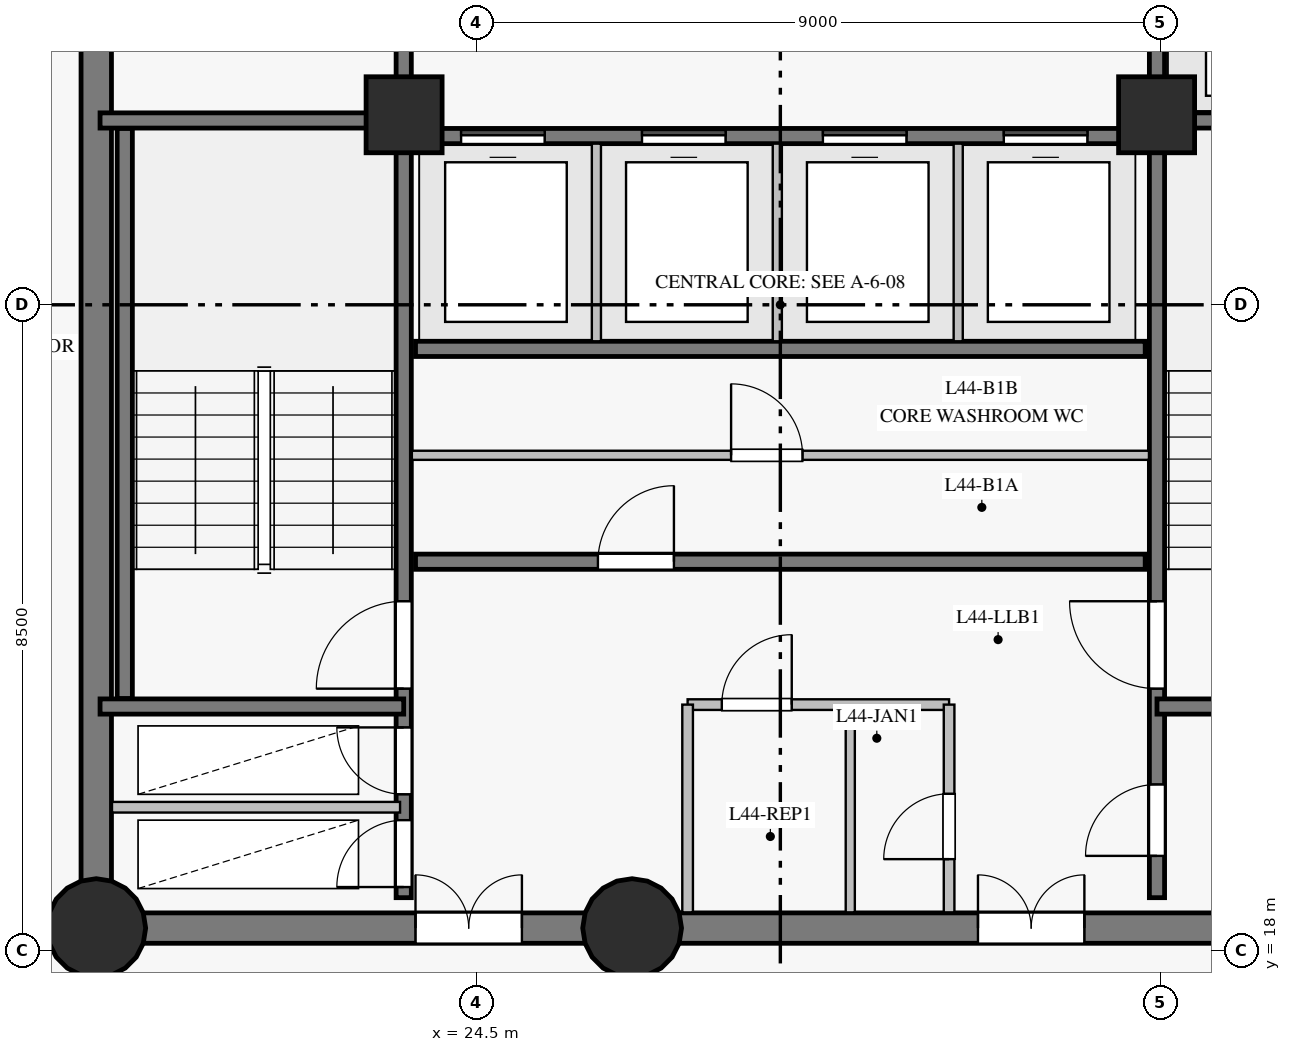
"""IFC4 building model, lengths in metres.
Left out: names, types, materials, properties, quantities, classifications, styles, units other than length and angle.
Written with IfcOpenShell. Run it as: python <this file> out.ifc"""

import sys

from ifc_helpers import new_model, si_unit, direction, frame, frame_2d, origin, origin_with_axes, origin_2d, place, context, subcontext, project, spatial, rectangle, circle, extrude, source, transform, mapped, element, fill, save


model = new_model("IFC4")
c1 = context("Model", 3, precision=1e-05, world=origin(), true_north=direction((0.0, 1.0)))
c2 = subcontext(c1, "Body", "Model", "MODEL_VIEW")
j1 = project(units=[si_unit("LENGTHUNIT", "METRE"), si_unit("PLANEANGLEUNIT", "RADIAN")], contexts=[c1])
p1 = place(None, origin())
s1 = spatial("IfcSite", under=j1, at=p1, CompositionType="ELEMENT")
p2 = place(p1, origin())
s2 = spatial("IfcBuilding", under=s1, at=p2, CompositionType="ELEMENT")
p3 = place(p2, frame((0.0, 0.0, 156.55)))
s3 = spatial("IfcBuildingStorey", under=s2, at=p3, CompositionType="ELEMENT", Elevation=156.55)
p4 = place(p3, frame((19.5, 18.3, 0.0), z_axis=(0.0, 0.0, 1.0), x_axis=(1.0, 0.0, 0.0)))
e1 = element("IfcWall", 1, at=p4, inside=s3, PredefinedType="SHEAR", context=c2, shape_type="SweptSolid", body=[
    extrude(rectangle(XDim=7.05, YDim=0.4, at=frame_2d((3.525, 0.0))), origin(), (0.0, 0.0, 1.0), 2.825),
])
p5 = place(p4, frame((4.2, 0.0, 0.0)))
e2 = element("IfcOpeningElement", 2, at=p5, cuts=e1, PredefinedType="OPENING", context=c2, shape_type="SweptSolid", body=[
    extrude(rectangle(XDim=1.4, YDim=2.2, at=frame_2d((0.7, 1.1))), frame((0.0, 0.21, 0.0), z_axis=(0.0, -1.0, 0.0), x_axis=(1.0, 0.0, 0.0)), (0.0, 0.0, 1.0), 0.42),
])
p6 = place(p3, frame((26.55, 18.3, 0.0), z_axis=(0.0, 0.0, 1.0), x_axis=(1.0, 0.0, 0.0)))
e3 = element("IfcWall", 3, at=p6, inside=s3, PredefinedType="SHEAR", context=c2, shape_type="SweptSolid", body=[
    extrude(rectangle(XDim=10.95, YDim=0.4, at=frame_2d((5.475, 0.0))), origin(), (0.0, 0.0, 1.0), 2.825),
])
p7 = place(p6, frame((4.55, 0.0, 0.0)))
e4 = element("IfcOpeningElement", 4, at=p7, cuts=e3, PredefinedType="OPENING", context=c2, shape_type="SweptSolid", body=[
    extrude(rectangle(XDim=1.4, YDim=2.2, at=frame_2d((0.7, 1.1))), frame((0.0, 0.21, 0.0), z_axis=(0.0, -1.0, 0.0), x_axis=(1.0, 0.0, 0.0)), (0.0, 0.0, 1.0), 0.42),
])
p8 = place(p3, frame((19.5, 34.7, 0.0), z_axis=(0.0, 0.0, 1.0), x_axis=(0.0, -1.0, 0.0)))
e5 = element("IfcWall", 5, at=p8, inside=s3, PredefinedType="SHEAR", context=c2, shape_type="SweptSolid", body=[
    extrude(rectangle(XDim=16.4, YDim=0.4, at=frame_2d((8.2, 0.0))), origin(), (0.0, 0.0, 1.0), 2.825),
])
p9 = place(p8, frame((3.1, 0.0, 0.0)))
e6 = element("IfcOpeningElement", 6, at=p9, cuts=e5, PredefinedType="OPENING", context=c2, shape_type="SweptSolid", body=[
    extrude(rectangle(XDim=1.1, YDim=2.15, at=frame_2d((0.55, 1.075))), frame((0.0, 0.21, 0.0), z_axis=(0.0, -1.0, 0.0), x_axis=(1.0, 0.0, 0.0)), (0.0, 0.0, 1.0), 0.42),
])
m1 = source(origin_with_axes(), c2, "Body", "SweptSolid", [
    extrude(circle(Radius=0.65, at=origin_2d()), origin(), (0.0, 0.0, 1.0), 3.05),
])
for number, where, z_axis, x_axis in (
    (7, (19.5, 18.3, 0.0), (0.0, 0.0, 1.0), (1.0, 0.0, 0.0)),
    (8, (26.55, 18.3, 0.0), (0.0, 0.0, 1.0), (1.0, 0.0, 0.0)),
):
    element("IfcColumn", number, at=place(p3, frame(where, z_axis=z_axis, x_axis=x_axis)), inside=s3, PredefinedType="COLUMN", context=c2, shape_type="MappedRepresentation", body=[
        mapped(m1, transform((0.0, 0.0, 0.0), scale=1.0)),
    ])
m2 = source(origin_with_axes(), c2, "Body", "SweptSolid", [
    extrude(rectangle(XDim=1.0, YDim=1.0, at=origin_2d()), origin(), (0.0, 0.0, 1.0), 3.05),
])
for number, where, z_axis, x_axis in (
    (9, (23.55, 29.0, 0.0), (0.0, 0.0, 1.0), (1.0, 0.0, 0.0)),
    (10, (33.45, 29.0, 0.0), (0.0, 0.0, 1.0), (1.0, 0.0, 0.0)),
):
    element("IfcColumn", number, at=place(p3, frame(where, z_axis=z_axis, x_axis=x_axis)), inside=s3, PredefinedType="COLUMN", context=c2, shape_type="MappedRepresentation", body=[
        mapped(m2, transform((0.0, 0.0, 0.0), scale=1.0)),
    ])
p10 = place(p3, frame((23.545, 18.7, 0.0), z_axis=(0.0, 0.0, 1.0), x_axis=(0.0, 1.0, 0.0)))
e11 = element("IfcWall", 11, at=p10, inside=s3, PredefinedType="SHEAR", context=c2, shape_type="SweptSolid", body=[
    extrude(rectangle(XDim=15.6, YDim=0.2, at=frame_2d((7.8, 0.0))), origin(), (0.0, 0.0, 1.0), 2.825),
])
p11 = place(p10, frame((2.75, 0.0, 0.0)))
e12 = element("IfcOpeningElement", 12, at=p11, cuts=e11, PredefinedType="OPENING", context=c2, shape_type="SweptSolid", body=[
    extrude(rectangle(XDim=1.15, YDim=2.15, at=frame_2d((0.575, 1.075))), frame((0.0, 0.11, 0.0), z_axis=(0.0, -1.0, 0.0), x_axis=(1.0, 0.0, 0.0)), (0.0, 0.0, 1.0), 0.22),
])
p12 = place(p10, frame((0.14, 0.0, 0.0)))
e13 = element("IfcOpeningElement", 13, at=p12, cuts=e11, PredefinedType="OPENING", context=c2, shape_type="SweptSolid", body=[
    extrude(rectangle(XDim=0.88, YDim=2.1, at=frame_2d((0.44, 1.05))), frame((0.0, 0.11, 0.0), z_axis=(0.0, -1.0, 0.0), x_axis=(1.0, 0.0, 0.0)), (0.0, 0.0, 1.0), 0.22),
])
p13 = place(p10, frame((1.36, 0.0, 0.0)))
e14 = element("IfcOpeningElement", 14, at=p13, cuts=e11, PredefinedType="OPENING", context=c2, shape_type="SweptSolid", body=[
    extrude(rectangle(XDim=0.88, YDim=2.1, at=frame_2d((0.44, 1.05))), frame((0.0, 0.11, 0.0), z_axis=(0.0, -1.0, 0.0), x_axis=(1.0, 0.0, 0.0)), (0.0, 0.0, 1.0), 0.22),
])
p14 = place(p10, frame((12.1, 0.0, 0.0)))
e15 = element("IfcOpeningElement", 15, at=p14, cuts=e11, PredefinedType="OPENING", context=c2, shape_type="SweptSolid", body=[
    extrude(rectangle(XDim=1.12, YDim=2.15, at=frame_2d((0.56, 1.075))), frame((0.0, 0.11, 0.0), z_axis=(0.0, -1.0, 0.0), x_axis=(1.0, 0.0, 0.0)), (0.0, 0.0, 1.0), 0.22),
])
p15 = place(p10, frame((14.05, 0.0, 0.0)))
e16 = element("IfcOpeningElement", 16, at=p15, cuts=e11, PredefinedType="OPENING", context=c2, shape_type="SweptSolid", body=[
    extrude(rectangle(XDim=1.12, YDim=2.15, at=frame_2d((0.56, 1.075))), frame((0.0, 0.11, 0.0), z_axis=(0.0, -1.0, 0.0), x_axis=(1.0, 0.0, 0.0)), (0.0, 0.0, 1.0), 0.22),
])
p16 = place(p3, frame((33.455, 18.7, 0.0), z_axis=(0.0, 0.0, 1.0), x_axis=(0.0, 1.0, 0.0)))
e17 = element("IfcWall", 17, at=p16, inside=s3, PredefinedType="SHEAR", context=c2, shape_type="SweptSolid", body=[
    extrude(rectangle(XDim=15.6, YDim=0.2, at=frame_2d((7.8, 0.0))), origin(), (0.0, 0.0, 1.0), 2.825),
])
p17 = place(p16, frame((2.75, 0.0, 0.0)))
e18 = element("IfcOpeningElement", 18, at=p17, cuts=e17, PredefinedType="OPENING", context=c2, shape_type="SweptSolid", body=[
    extrude(rectangle(XDim=1.15, YDim=2.15, at=frame_2d((0.575, 1.075))), frame((0.0, 0.11, 0.0), z_axis=(0.0, -1.0, 0.0), x_axis=(1.0, 0.0, 0.0)), (0.0, 0.0, 1.0), 0.22),
])
p18 = place(p16, frame((0.55, 0.0, 0.0)))
e19 = element("IfcOpeningElement", 19, at=p18, cuts=e17, PredefinedType="OPENING", context=c2, shape_type="SweptSolid", body=[
    extrude(rectangle(XDim=0.94, YDim=2.1, at=frame_2d((0.47, 1.05))), frame((0.0, 0.11, 0.0), z_axis=(0.0, -1.0, 0.0), x_axis=(1.0, 0.0, 0.0)), (0.0, 0.0, 1.0), 0.22),
])
p19 = place(p3, frame((23.7, 23.12, 0.0), z_axis=(0.0, 0.0, 1.0), x_axis=(1.0, 0.0, 0.0)))
e20 = element("IfcWall", 20, at=p19, inside=s3, PredefinedType="SHEAR", context=c2, shape_type="SweptSolid", body=[
    extrude(rectangle(XDim=9.6, YDim=0.2, at=frame_2d((4.8, 0.0))), origin(), (0.0, 0.0, 1.0), 2.825),
])
p20 = place(p19, frame((2.4, 0.0, 0.0)))
e21 = element("IfcOpeningElement", 21, at=p20, cuts=e20, PredefinedType="OPENING", context=c2, shape_type="SweptSolid", body=[
    extrude(rectangle(XDim=1.0, YDim=2.15, at=frame_2d((0.5, 1.075))), frame((0.0, 0.11, 0.0), z_axis=(0.0, -1.0, 0.0), x_axis=(1.0, 0.0, 0.0)), (0.0, 0.0, 1.0), 0.22),
])
p21 = place(p3, frame((23.7, 25.92, 0.0), z_axis=(0.0, 0.0, 1.0), x_axis=(1.0, 0.0, 0.0)))
e22 = element("IfcWall", 22, at=p21, inside=s3, PredefinedType="SHEAR", context=c2, shape_type="SweptSolid", body=[
    extrude(rectangle(XDim=9.6, YDim=0.2, at=frame_2d((4.8, 0.0))), origin(), (0.0, 0.0, 1.0), 2.825),
])
p22 = place(p3, frame((23.7, 28.72, 0.0), z_axis=(0.0, 0.0, 1.0), x_axis=(1.0, 0.0, 0.0)))
e23 = element("IfcWall", 23, at=p22, inside=s3, PredefinedType="SHEAR", context=c2, shape_type="SweptSolid", body=[
    extrude(rectangle(XDim=9.6, YDim=0.2, at=frame_2d((4.8, 0.0))), origin(), (0.0, 0.0, 1.0), 2.825),
])
p23 = place(p22, frame((0.6, 0.0, 0.0)))
e24 = element("IfcOpeningElement", 24, at=p23, cuts=e23, PredefinedType="OPENING", context=c2, shape_type="SweptSolid", body=[
    extrude(rectangle(XDim=1.1, YDim=2.15, at=frame_2d((0.55, 1.075))), frame((0.0, 0.11, 0.0), z_axis=(0.0, -1.0, 0.0), x_axis=(1.0, 0.0, 0.0)), (0.0, 0.0, 1.0), 0.22),
])
p24 = place(p22, frame((2.98, 0.0, 0.0)))
e25 = element("IfcOpeningElement", 25, at=p24, cuts=e23, PredefinedType="OPENING", context=c2, shape_type="SweptSolid", body=[
    extrude(rectangle(XDim=1.1, YDim=2.15, at=frame_2d((0.55, 1.075))), frame((0.0, 0.11, 0.0), z_axis=(0.0, -1.0, 0.0), x_axis=(1.0, 0.0, 0.0)), (0.0, 0.0, 1.0), 0.22),
])
p25 = place(p22, frame((5.36, 0.0, 0.0)))
e26 = element("IfcOpeningElement", 26, at=p25, cuts=e23, PredefinedType="OPENING", context=c2, shape_type="SweptSolid", body=[
    extrude(rectangle(XDim=1.1, YDim=2.15, at=frame_2d((0.55, 1.075))), frame((0.0, 0.11, 0.0), z_axis=(0.0, -1.0, 0.0), x_axis=(1.0, 0.0, 0.0)), (0.0, 0.0, 1.0), 0.22),
])
p26 = place(p22, frame((7.74, 0.0, 0.0)))
e27 = element("IfcOpeningElement", 27, at=p26, cuts=e23, PredefinedType="OPENING", context=c2, shape_type="SweptSolid", body=[
    extrude(rectangle(XDim=1.1, YDim=2.15, at=frame_2d((0.55, 1.075))), frame((0.0, 0.11, 0.0), z_axis=(0.0, -1.0, 0.0), x_axis=(1.0, 0.0, 0.0)), (0.0, 0.0, 1.0), 0.22),
])
p27 = place(p3, frame((19.875, 21.32, 0.0), z_axis=(0.0, 0.0, 1.0), x_axis=(0.0, 1.0, 0.0)))
e28 = element("IfcWall", 28, at=p27, inside=s3, PredefinedType="SHEAR", context=c2, shape_type="SweptSolid", body=[
    extrude(rectangle(XDim=7.5, YDim=0.2, at=frame_2d((3.75, 0.0))), origin(), (0.0, 0.0, 1.0), 2.825),
])
for number, where, z_axis, x_axis in (
    (29, (33.455, 21.215, 0.0), (0.0, 0.0, 1.0), (1.0, 0.0, 0.0)),
    (30, (33.455, 28.925, 0.0), (0.0, 0.0, 1.0), (1.0, 0.0, 0.0)),
    (31, (19.55, 21.215, 0.0), (0.0, 0.0, 1.0), (1.0, 0.0, 0.0)),
    (32, (19.55, 28.925, 0.0), (0.0, 0.0, 1.0), (1.0, 0.0, 0.0)),
):
    element("IfcWall", number, at=place(p3, frame(where, z_axis=z_axis, x_axis=x_axis)), inside=s3, PredefinedType="SHEAR", context=c2, shape_type="SweptSolid", body=[
        extrude(rectangle(XDim=3.995, YDim=0.2, at=frame_2d((1.998, 0.0))), origin(), (0.0, 0.0, 1.0), 2.825),
    ])
p28 = place(p3, frame((23.652, 24.52, 0.0), z_axis=(0.0, 0.0, 1.0), x_axis=(1.0, 0.0, 0.0)))
e33 = element("IfcWall", 33, at=p28, inside=s3, PredefinedType="PARTITIONING", context=c2, shape_type="SweptSolid", body=[
    extrude(rectangle(XDim=9.698, YDim=0.12, at=frame_2d((4.849, 0.0))), origin(), (0.0, 0.0, 1.0), 2.825),
])
p29 = place(p28, frame((4.2, 0.0, 0.0)))
e34 = element("IfcOpeningElement", 34, at=p29, cuts=e33, PredefinedType="OPENING", context=c2, shape_type="SweptSolid", body=[
    extrude(rectangle(XDim=0.94, YDim=2.1, at=frame_2d((0.47, 1.05))), frame((0.0, 0.07, 0.0), z_axis=(0.0, -1.0, 0.0), x_axis=(1.0, 0.0, 0.0)), (0.0, 0.0, 1.0), 0.14),
])
p30 = place(p3, frame((19.707, 19.89, 0.0), z_axis=(0.0, 0.0, 1.0), x_axis=(1.0, 0.0, 0.0)))
e35 = element("IfcWall", 35, at=p30, inside=s3, PredefinedType="PARTITIONING", context=c2, shape_type="SweptSolid", body=[
    extrude(rectangle(XDim=3.79, YDim=0.14, at=frame_2d((1.895, 0.0))), origin(), (0.0, 0.0, 1.0), 2.825),
])
p31 = place(p3, frame((27.28, 21.24, 0.0), z_axis=(0.0, 0.0, 1.0), x_axis=(1.0, 0.0, 0.0)))
e36 = element("IfcWall", 36, at=p31, inside=s3, PredefinedType="PARTITIONING", context=c2, shape_type="SweptSolid", body=[
    extrude(rectangle(XDim=3.44, YDim=0.14, at=frame_2d((1.72, 0.0))), origin(), (0.0, 0.0, 1.0), 2.825),
])
p32 = place(p31, frame((0.45, 0.0, 0.0)))
e37 = element("IfcOpeningElement", 37, at=p32, cuts=e36, PredefinedType="OPENING", context=c2, shape_type="SweptSolid", body=[
    extrude(rectangle(XDim=0.92, YDim=2.1, at=frame_2d((0.46, 1.05))), frame((0.0, 0.08, 0.0), z_axis=(0.0, -1.0, 0.0), x_axis=(1.0, 0.0, 0.0)), (0.0, 0.0, 1.0), 0.16),
])
p33 = place(p3, frame((27.28, 18.507, 0.0), z_axis=(0.0, 0.0, 1.0), x_axis=(0.0, 1.0, 0.0)))
e38 = element("IfcWall", 38, at=p33, inside=s3, PredefinedType="PARTITIONING", context=c2, shape_type="SweptSolid", body=[
    extrude(rectangle(XDim=2.733, YDim=0.14, at=frame_2d((1.366, 0.0))), origin(), (0.0, 0.0, 1.0), 2.825),
])
p34 = place(p3, frame((30.72, 18.507, 0.0), z_axis=(0.0, 0.0, 1.0), x_axis=(0.0, 1.0, 0.0)))
e39 = element("IfcWall", 39, at=p34, inside=s3, PredefinedType="PARTITIONING", context=c2, shape_type="SweptSolid", body=[
    extrude(rectangle(XDim=2.733, YDim=0.14, at=frame_2d((1.366, 0.0))), origin(), (0.0, 0.0, 1.0), 2.825),
])
p35 = place(p34, frame((0.7, 0.0, 0.0)))
e40 = element("IfcOpeningElement", 40, at=p35, cuts=e39, PredefinedType="OPENING", context=c2, shape_type="SweptSolid", body=[
    extrude(rectangle(XDim=0.86, YDim=2.1, at=frame_2d((0.43, 1.05))), frame((0.0, 0.08, 0.0), z_axis=(0.0, -1.0, 0.0), x_axis=(1.0, 0.0, 0.0)), (0.0, 0.0, 1.0), 0.16),
])
for number, where, z_axis, x_axis in (
    (41, (26.08, 26.02, 0.0), (0.0, 0.0, 1.0), (0.0, 1.0, 0.0)),
    (42, (28.46, 26.02, 0.0), (0.0, 0.0, 1.0), (0.0, 1.0, 0.0)),
    (43, (30.84, 26.02, 0.0), (0.0, 0.0, 1.0), (0.0, 1.0, 0.0)),
):
    element("IfcWall", number, at=place(p3, frame(where, z_axis=z_axis, x_axis=x_axis)), inside=s3, PredefinedType="PARTITIONING", context=c2, shape_type="SweptSolid", body=[
        extrude(rectangle(XDim=2.6, YDim=0.12, at=frame_2d((1.3, 0.0))), origin(), (0.0, 0.0, 1.0), 2.825),
    ])
p36 = place(p3, frame((29.42, 18.507, 0.0), z_axis=(0.0, 0.0, 1.0), x_axis=(0.0, 1.0, 0.0)))
e44 = element("IfcWall", 44, at=p36, inside=s3, PredefinedType="PARTITIONING", context=c2, shape_type="SweptSolid", body=[
    extrude(rectangle(XDim=2.662, YDim=0.12, at=frame_2d((1.331, 0.0))), origin(), (0.0, 0.0, 1.0), 2.825),
])
m3 = source(origin_with_axes(), c2, "Body", "SweptSolid", [
    extrude(rectangle(XDim=1.15, YDim=2.15, at=frame_2d((0.575, 1.075))), frame((0.0, 0.025, 0.0), z_axis=(0.0, -1.0, 0.0), x_axis=(1.0, 0.0, 0.0)), (0.0, 0.0, 1.0), 0.05),
])
p37 = place(p11, origin())
e45 = element("IfcDoor", 45, at=p37, inside=s3, OperationType="SINGLE_SWING_LEFT", PredefinedType="DOOR", context=c2, shape_type="MappedRepresentation", body=[
    mapped(m3, transform((0.0, 0.0, 0.0), scale=1.0)),
])
fill(e12, e45)
p38 = place(p17, origin())
e46 = element("IfcDoor", 46, at=p38, inside=s3, OperationType="SINGLE_SWING_RIGHT", PredefinedType="DOOR", context=c2, shape_type="MappedRepresentation", body=[
    mapped(m3, transform((0.0, 0.0, 0.0), scale=1.0)),
])
fill(e18, e46)
m4 = source(origin_with_axes(), c2, "Body", "SweptSolid", [
    extrude(rectangle(XDim=0.88, YDim=2.1, at=frame_2d((0.44, 1.05))), frame((0.0, 0.025, 0.0), z_axis=(0.0, -1.0, 0.0), x_axis=(1.0, 0.0, 0.0)), (0.0, 0.0, 1.0), 0.05),
])
p39 = place(p12, origin())
e47 = element("IfcDoor", 47, at=p39, inside=s3, OperationType="SINGLE_SWING_LEFT", PredefinedType="DOOR", context=c2, shape_type="MappedRepresentation", body=[
    mapped(m4, transform((0.0, 0.0, 0.0), scale=1.0)),
])
fill(e13, e47)
p40 = place(p13, origin())
e48 = element("IfcDoor", 48, at=p40, inside=s3, OperationType="SINGLE_SWING_RIGHT", PredefinedType="DOOR", context=c2, shape_type="MappedRepresentation", body=[
    mapped(m4, transform((0.0, 0.0, 0.0), scale=1.0)),
])
fill(e14, e48)
m5 = source(origin_with_axes(), c2, "Body", "SweptSolid", [
    extrude(rectangle(XDim=1.4, YDim=2.2, at=frame_2d((0.7, 1.1))), frame((0.0, 0.025, 0.0), z_axis=(0.0, -1.0, 0.0), x_axis=(1.0, 0.0, 0.0)), (0.0, 0.0, 1.0), 0.05),
])
p41 = place(p5, origin())
e49 = element("IfcDoor", 49, at=p41, inside=s3, OperationType="DOUBLE_DOOR_SINGLE_SWING", PredefinedType="DOOR", context=c2, shape_type="MappedRepresentation", body=[
    mapped(m5, transform((0.0, 0.0, 0.0), scale=1.0)),
])
fill(e2, e49)
p42 = place(p7, origin())
e50 = element("IfcDoor", 50, at=p42, inside=s3, OperationType="DOUBLE_DOOR_SINGLE_SWING", PredefinedType="DOOR", context=c2, shape_type="MappedRepresentation", body=[
    mapped(m5, transform((0.0, 0.0, 0.0), scale=1.0)),
])
fill(e4, e50)
m6 = source(origin_with_axes(), c2, "Body", "SweptSolid", [
    extrude(rectangle(XDim=0.94, YDim=2.1, at=frame_2d((0.47, 1.05))), frame((0.0, 0.025, 0.0), z_axis=(0.0, -1.0, 0.0), x_axis=(1.0, 0.0, 0.0)), (0.0, 0.0, 1.0), 0.05),
])
p43 = place(p18, origin())
e51 = element("IfcDoor", 51, at=p43, inside=s3, OperationType="SINGLE_SWING_LEFT", PredefinedType="DOOR", context=c2, shape_type="MappedRepresentation", body=[
    mapped(m6, transform((0.0, 0.0, 0.0), scale=1.0)),
])
fill(e19, e51)
m7 = source(origin_with_axes(), c2, "Body", "SweptSolid", [
    extrude(rectangle(XDim=0.92, YDim=2.1, at=frame_2d((0.46, 1.05))), frame((0.0, 0.025, 0.0), z_axis=(0.0, -1.0, 0.0), x_axis=(1.0, 0.0, 0.0)), (0.0, 0.0, 1.0), 0.05),
])
p44 = place(p32, origin())
e52 = element("IfcDoor", 52, at=p44, inside=s3, OperationType="SINGLE_SWING_RIGHT", PredefinedType="DOOR", context=c2, shape_type="MappedRepresentation", body=[
    mapped(m7, transform((0.0, 0.0, 0.0), scale=1.0)),
])
fill(e37, e52)
m8 = source(origin_with_axes(), c2, "Body", "SweptSolid", [
    extrude(rectangle(XDim=0.86, YDim=2.1, at=frame_2d((0.43, 1.05))), frame((0.0, 0.025, 0.0), z_axis=(0.0, -1.0, 0.0), x_axis=(1.0, 0.0, 0.0)), (0.0, 0.0, 1.0), 0.05),
])
p45 = place(p35, origin())
e53 = element("IfcDoor", 53, at=p45, inside=s3, OperationType="SINGLE_SWING_LEFT", PredefinedType="DOOR", context=c2, shape_type="MappedRepresentation", body=[
    mapped(m8, transform((0.0, 0.0, 0.0), scale=1.0)),
])
fill(e40, e53)
m9 = source(origin_with_axes(), c2, "Body", "SweptSolid", [
    extrude(rectangle(XDim=1.0, YDim=2.15, at=frame_2d((0.5, 1.075))), frame((0.0, 0.025, 0.0), z_axis=(0.0, -1.0, 0.0), x_axis=(1.0, 0.0, 0.0)), (0.0, 0.0, 1.0), 0.05),
])
p46 = place(p20, origin())
e54 = element("IfcDoor", 54, at=p46, inside=s3, OperationType="SINGLE_SWING_RIGHT", PredefinedType="DOOR", context=c2, shape_type="MappedRepresentation", body=[
    mapped(m9, transform((0.0, 0.0, 0.0), scale=1.0)),
])
fill(e21, e54)
p47 = place(p29, origin())
e55 = element("IfcDoor", 55, at=p47, inside=s3, OperationType="SINGLE_SWING_LEFT", PredefinedType="DOOR", context=c2, shape_type="MappedRepresentation", body=[
    mapped(m6, transform((0.0, 0.0, 0.0), scale=1.0)),
])
fill(e34, e55)
m10 = source(origin_with_axes(), c2, "Body", "SweptSolid", [
    extrude(rectangle(XDim=1.1, YDim=2.15, at=frame_2d((0.55, 1.075))), frame((0.0, 0.025, 0.0), z_axis=(0.0, -1.0, 0.0), x_axis=(1.0, 0.0, 0.0)), (0.0, 0.0, 1.0), 0.05),
])
p48 = place(p23, origin())
e56 = element("IfcDoor", 56, at=p48, inside=s3, OperationType="SLIDING_TO_LEFT", PredefinedType="DOOR", context=c2, shape_type="MappedRepresentation", body=[
    mapped(m10, transform((0.0, 0.0, 0.0), scale=1.0)),
])
fill(e24, e56)
p49 = place(p24, origin())
e57 = element("IfcDoor", 57, at=p49, inside=s3, OperationType="SLIDING_TO_RIGHT", PredefinedType="DOOR", context=c2, shape_type="MappedRepresentation", body=[
    mapped(m10, transform((0.0, 0.0, 0.0), scale=1.0)),
])
fill(e25, e57)
p50 = place(p25, origin())
e58 = element("IfcDoor", 58, at=p50, inside=s3, OperationType="SLIDING_TO_LEFT", PredefinedType="DOOR", context=c2, shape_type="MappedRepresentation", body=[
    mapped(m10, transform((0.0, 0.0, 0.0), scale=1.0)),
])
fill(e26, e58)
p51 = place(p26, origin())
e59 = element("IfcDoor", 59, at=p51, inside=s3, OperationType="SLIDING_TO_RIGHT", PredefinedType="DOOR", context=c2, shape_type="MappedRepresentation", body=[
    mapped(m10, transform((0.0, 0.0, 0.0), scale=1.0)),
])
fill(e27, e59)
save(model, sys.argv[1])
